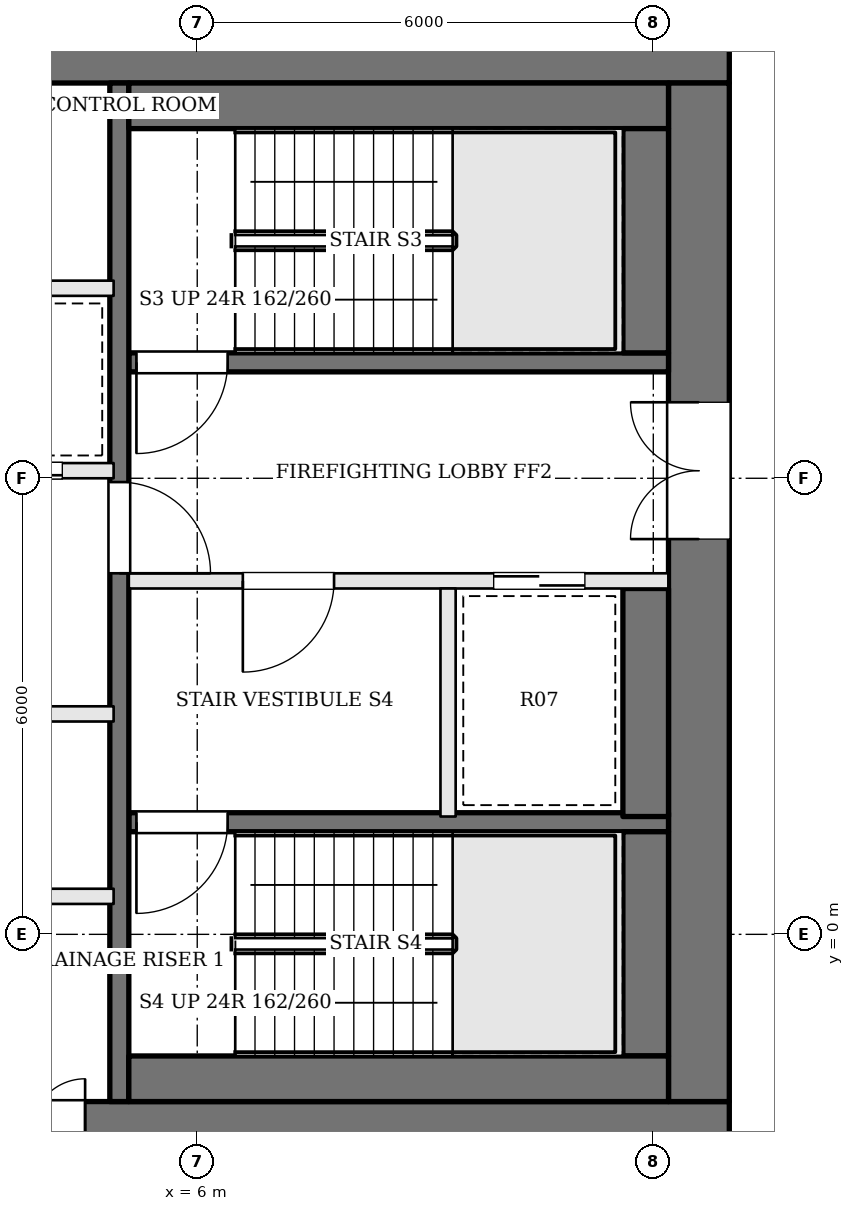
"""IFC4 building model, lengths in metres.
Left out: names, types, materials, properties, quantities, classifications, styles, units other than length and angle.
Written with IfcOpenShell. Run it as: python <this file> out.ifc"""

import sys

from ifc_helpers import new_model, si_unit, direction, frame, frame_2d, origin, place, context, subcontext, project, spatial, rectangle, extrude, element, fill, save


model = new_model("IFC4")
c1 = context("Model", 3, precision=1e-05, world=origin(), true_north=direction((0.0, 1.0)))
c2 = subcontext(c1, "Body", "Model", "MODEL_VIEW")
j1 = project(units=[si_unit("LENGTHUNIT", "METRE"), si_unit("PLANEANGLEUNIT", "RADIAN")], contexts=[c1])
p1 = place(None, origin())
s1 = spatial("IfcSite", under=j1, at=p1, CompositionType="ELEMENT")
p2 = place(p1, origin())
s2 = spatial("IfcBuilding", under=s1, at=p2, CompositionType="ELEMENT")
p3 = place(p2, frame((0.0, 0.0, 300.0)))
s3 = spatial("IfcBuildingStorey", under=s2, at=p3, CompositionType="ELEMENT", Elevation=300.0)
p4 = place(p3, frame((-13.0, 11.6, 0.0), z_axis=(0.0, 0.0, 1.0), x_axis=(1.0, 0.0, 0.0)))
e1 = element("IfcWall", 1, at=p4, inside=s3, PredefinedType="SHEAR", context=c2, shape_type="SweptSolid", body=[
    extrude(rectangle(XDim=26.0, YDim=0.8, at=frame_2d((13.0, 0.0))), origin(), (0.0, 0.0, 1.0), 3.9),
])
p5 = place(p4, frame((8.975, 0.0, 0.0)))
e2 = element("IfcOpeningElement", 2, at=p5, cuts=e1, PredefinedType="OPENING", context=c2, shape_type="SweptSolid", body=[
    extrude(rectangle(XDim=0.7, YDim=2.1, at=frame_2d((0.35, 1.05))), frame((0.0, 0.41, 0.0), z_axis=(0.0, -1.0, 0.0), x_axis=(1.0, 0.0, 0.0)), (0.0, 0.0, 1.0), 0.82),
])
p6 = place(p4, frame((11.025, 0.0, 0.0)))
e3 = element("IfcOpeningElement", 3, at=p6, cuts=e1, PredefinedType="OPENING", context=c2, shape_type="SweptSolid", body=[
    extrude(rectangle(XDim=0.7, YDim=2.1, at=frame_2d((0.35, 1.05))), frame((0.0, 0.41, 0.0), z_axis=(0.0, -1.0, 0.0), x_axis=(1.0, 0.0, 0.0)), (0.0, 0.0, 1.0), 0.82),
])
p7 = place(p4, frame((12.925, 0.0, 0.0)))
e4 = element("IfcOpeningElement", 4, at=p7, cuts=e1, PredefinedType="OPENING", context=c2, shape_type="SweptSolid", body=[
    extrude(rectangle(XDim=1.0, YDim=2.1, at=frame_2d((0.5, 1.05))), frame((0.0, 0.41, 0.0), z_axis=(0.0, -1.0, 0.0), x_axis=(1.0, 0.0, 0.0)), (0.0, 0.0, 1.0), 0.82),
])
p8 = place(p4, frame((15.775, 0.0, 0.0)))
e5 = element("IfcOpeningElement", 5, at=p8, cuts=e1, PredefinedType="OPENING", context=c2, shape_type="SweptSolid", body=[
    extrude(rectangle(XDim=1.0, YDim=2.1, at=frame_2d((0.5, 1.05))), frame((0.0, 0.41, 0.0), z_axis=(0.0, -1.0, 0.0), x_axis=(1.0, 0.0, 0.0)), (0.0, 0.0, 1.0), 0.82),
])
p9 = place(p3, frame((-13.0, -2.6, 0.0), z_axis=(0.0, 0.0, 1.0), x_axis=(1.0, 0.0, 0.0)))
e6 = element("IfcWall", 6, at=p9, inside=s3, PredefinedType="SHEAR", context=c2, shape_type="SweptSolid", body=[
    extrude(rectangle(XDim=26.0, YDim=0.8, at=frame_2d((13.0, 0.0))), origin(), (0.0, 0.0, 1.0), 3.9),
])
p10 = place(p9, frame((9.65, 0.0, 0.0)))
e7 = element("IfcOpeningElement", 7, at=p10, cuts=e6, PredefinedType="OPENING", context=c2, shape_type="SweptSolid", body=[
    extrude(rectangle(XDim=0.9, YDim=2.1, at=frame_2d((0.45, 1.05))), frame((0.0, 0.41, 0.0), z_axis=(0.0, -1.0, 0.0), x_axis=(1.0, 0.0, 0.0)), (0.0, 0.0, 1.0), 0.82),
])
p11 = place(p9, frame((12.925, 0.0, 0.0)))
e8 = element("IfcOpeningElement", 8, at=p11, cuts=e6, PredefinedType="OPENING", context=c2, shape_type="SweptSolid", body=[
    extrude(rectangle(XDim=0.9, YDim=2.1, at=frame_2d((0.45, 1.05))), frame((0.0, 0.41, 0.0), z_axis=(0.0, -1.0, 0.0), x_axis=(1.0, 0.0, 0.0)), (0.0, 0.0, 1.0), 0.82),
])
p12 = place(p9, frame((15.05, 0.0, 0.0)))
e9 = element("IfcOpeningElement", 9, at=p12, cuts=e6, PredefinedType="OPENING", context=c2, shape_type="SweptSolid", body=[
    extrude(rectangle(XDim=1.0, YDim=2.1, at=frame_2d((0.5, 1.05))), frame((0.0, 0.41, 0.0), z_axis=(0.0, -1.0, 0.0), x_axis=(1.0, 0.0, 0.0)), (0.0, 0.0, 1.0), 0.82),
])
p13 = place(p9, frame((16.825, 0.0, 0.0)))
e10 = element("IfcOpeningElement", 10, at=p13, cuts=e6, PredefinedType="OPENING", context=c2, shape_type="SweptSolid", body=[
    extrude(rectangle(XDim=0.7, YDim=2.1, at=frame_2d((0.35, 1.05))), frame((0.0, 0.41, 0.0), z_axis=(0.0, -1.0, 0.0), x_axis=(1.0, 0.0, 0.0)), (0.0, 0.0, 1.0), 0.82),
])
p14 = place(p3, frame((12.6, -2.2, 0.0), z_axis=(0.0, 0.0, 1.0), x_axis=(0.0, 1.0, 0.0)))
e11 = element("IfcWall", 11, at=p14, inside=s3, PredefinedType="SHEAR", context=c2, shape_type="SweptSolid", body=[
    extrude(rectangle(XDim=13.4, YDim=0.8, at=frame_2d((6.7, 0.0))), origin(), (0.0, 0.0, 1.0), 3.9),
])
p15 = place(p14, frame((7.4, 0.0, 0.0)))
e12 = element("IfcOpeningElement", 12, at=p15, cuts=e11, PredefinedType="OPENING", context=c2, shape_type="SweptSolid", body=[
    extrude(rectangle(XDim=1.8, YDim=2.1, at=frame_2d((0.9, 1.05))), frame((0.0, 0.41, 0.0), z_axis=(0.0, -1.0, 0.0), x_axis=(1.0, 0.0, 0.0)), (0.0, 0.0, 1.0), 0.82),
])
p16 = place(p3, frame((12.2, 7.525, 0.0), z_axis=(0.0, 0.0, 1.0), x_axis=(-1.0, 0.0, 0.0)))
e13 = element("IfcWall", 13, at=p16, inside=s3, PredefinedType="SOLIDWALL", context=c2, shape_type="SweptSolid", body=[
    extrude(rectangle(XDim=7.1, YDim=0.25, at=frame_2d((3.55, 0.0))), origin(), (0.0, 0.0, 1.0), 3.7),
])
p17 = place(p16, frame((5.8, 0.0, 0.0)))
e14 = element("IfcOpeningElement", 14, at=p17, cuts=e13, PredefinedType="OPENING", context=c2, shape_type="SweptSolid", body=[
    extrude(rectangle(XDim=1.2, YDim=2.1, at=frame_2d((0.6, 1.05))), frame((0.0, 0.135, 0.0), z_axis=(0.0, -1.0, 0.0), x_axis=(1.0, 0.0, 0.0)), (0.0, 0.0, 1.0), 0.27),
])
p18 = place(p3, frame((12.2, 4.65, 0.0), z_axis=(0.0, 0.0, 1.0), x_axis=(-1.0, 0.0, 0.0)))
e15 = element("IfcWall", 15, at=p18, inside=s3, PredefinedType="SOLIDWALL", context=c2, shape_type="SweptSolid", body=[
    extrude(rectangle(XDim=7.1, YDim=0.2, at=frame_2d((3.55, 0.0))), origin(), (0.0, 0.0, 1.0), 3.7),
])
p19 = place(p18, frame((4.4, 0.0, 0.0)))
e16 = element("IfcOpeningElement", 16, at=p19, cuts=e15, PredefinedType="OPENING", context=c2, shape_type="SweptSolid", body=[
    extrude(rectangle(XDim=1.2, YDim=2.1, at=frame_2d((0.6, 1.05))), frame((0.0, 0.11, 0.0), z_axis=(0.0, -1.0, 0.0), x_axis=(1.0, 0.0, 0.0)), (0.0, 0.0, 1.0), 0.22),
])
p20 = place(p18, frame((1.1, 0.0, 0.0)))
e17 = element("IfcOpeningElement", 17, at=p20, cuts=e15, PredefinedType="OPENING", context=c2, shape_type="SweptSolid", body=[
    extrude(rectangle(XDim=1.2, YDim=2.1, at=frame_2d((0.6, 1.05))), frame((0.0, 0.11, 0.0), z_axis=(0.0, -1.0, 0.0), x_axis=(1.0, 0.0, 0.0)), (0.0, 0.0, 1.0), 0.22),
])
p21 = place(p3, frame((12.2, 1.475, 0.0), z_axis=(0.0, 0.0, 1.0), x_axis=(-1.0, 0.0, 0.0)))
e18 = element("IfcWall", 18, at=p21, inside=s3, PredefinedType="SOLIDWALL", context=c2, shape_type="SweptSolid", body=[
    extrude(rectangle(XDim=7.1, YDim=0.25, at=frame_2d((3.55, 0.0))), origin(), (0.0, 0.0, 1.0), 3.7),
])
p22 = place(p21, frame((5.8, 0.0, 0.0)))
e19 = element("IfcOpeningElement", 19, at=p22, cuts=e18, PredefinedType="OPENING", context=c2, shape_type="SweptSolid", body=[
    extrude(rectangle(XDim=1.2, YDim=2.1, at=frame_2d((0.6, 1.05))), frame((0.0, 0.135, 0.0), z_axis=(0.0, -1.0, 0.0), x_axis=(1.0, 0.0, 0.0)), (0.0, 0.0, 1.0), 0.27),
])
p23 = place(p3, frame((9.3, 4.55, 0.0), z_axis=(0.0, 0.0, 1.0), x_axis=(0.0, -1.0, 0.0)))
e20 = element("IfcWall", 20, at=p23, inside=s3, PredefinedType="SOLIDWALL", context=c2, shape_type="SweptSolid", body=[
    extrude(rectangle(XDim=3.0, YDim=0.2, at=frame_2d((1.5, 0.0))), origin(), (0.0, 0.0, 1.0), 3.7),
])
p24 = place(p3, frame((4.975, 11.2, 0.0), z_axis=(0.0, 0.0, 1.0), x_axis=(0.0, -1.0, 0.0)))
e21 = element("IfcWall", 21, at=p24, inside=s3, PredefinedType="SOLIDWALL", context=c2, shape_type="SweptSolid", body=[
    extrude(rectangle(XDim=13.4, YDim=0.25, at=frame_2d((6.7, 0.0))), origin(), (0.0, 0.0, 1.0), 3.7),
])
p25 = place(p24, frame((5.25, 0.0, 0.0)))
e22 = element("IfcOpeningElement", 22, at=p25, cuts=e21, PredefinedType="OPENING", context=c2, shape_type="SweptSolid", body=[
    extrude(rectangle(XDim=1.2, YDim=2.1, at=frame_2d((0.6, 1.05))), frame((0.0, 0.135, 0.0), z_axis=(0.0, -1.0, 0.0), x_axis=(1.0, 0.0, 0.0)), (0.0, 0.0, 1.0), 0.27),
])
p26 = place(p3, frame((12.2, 10.9, 0.0), z_axis=(0.0, 0.0, 1.0), x_axis=(-1.0, 0.0, 0.0)))
e23 = element("IfcWall", 23, at=p26, inside=s3, PredefinedType="SOLIDWALL", context=c2, shape_type="SweptSolid", body=[
    extrude(rectangle(XDim=7.1, YDim=0.6, at=frame_2d((3.55, 0.0))), origin(), (0.0, 0.0, 1.0), 3.7),
])
p27 = place(p3, frame((11.9, 10.6, 0.0), z_axis=(0.0, 0.0, 1.0), x_axis=(0.0, -1.0, 0.0)))
e24 = element("IfcWall", 24, at=p27, inside=s3, PredefinedType="SOLIDWALL", context=c2, shape_type="SweptSolid", body=[
    extrude(rectangle(XDim=2.95, YDim=0.6, at=frame_2d((1.475, 0.0))), origin(), (0.0, 0.0, 1.0), 3.7),
])
p28 = place(p3, frame((11.9, 4.55, 0.0), z_axis=(0.0, 0.0, 1.0), x_axis=(0.0, -1.0, 0.0)))
e25 = element("IfcWall", 25, at=p28, inside=s3, PredefinedType="SOLIDWALL", context=c2, shape_type="SweptSolid", body=[
    extrude(rectangle(XDim=3.0, YDim=0.6, at=frame_2d((1.5, 0.0))), origin(), (0.0, 0.0, 1.0), 3.7),
])
p29 = place(p3, frame((11.9, 1.35, 0.0), z_axis=(0.0, 0.0, 1.0), x_axis=(0.0, -1.0, 0.0)))
e26 = element("IfcWall", 26, at=p29, inside=s3, PredefinedType="SOLIDWALL", context=c2, shape_type="SweptSolid", body=[
    extrude(rectangle(XDim=2.95, YDim=0.6, at=frame_2d((1.475, 0.0))), origin(), (0.0, 0.0, 1.0), 3.7),
])
p30 = place(p3, frame((12.2, -1.9, 0.0), z_axis=(0.0, 0.0, 1.0), x_axis=(-1.0, 0.0, 0.0)))
e27 = element("IfcWall", 27, at=p30, inside=s3, PredefinedType="SOLIDWALL", context=c2, shape_type="SweptSolid", body=[
    extrude(rectangle(XDim=7.1, YDim=0.6, at=frame_2d((3.55, 0.0))), origin(), (0.0, 0.0, 1.0), 3.7),
])
p31 = place(p3, frame((-4.9, 0.5, 0.0), z_axis=(0.0, 0.0, 1.0), x_axis=(1.0, 0.0, 0.0)))
e28 = element("IfcWall", 28, at=p31, inside=s3, PredefinedType="SOLIDWALL", context=c2, shape_type="SweptSolid", body=[
    extrude(rectangle(XDim=9.8, YDim=0.2, at=frame_2d((4.9, 0.0))), origin(), (0.0, 0.0, 1.0), 3.7),
])
p32 = place(p3, frame((-4.9, 2.9, 0.0), z_axis=(0.0, 0.0, 1.0), x_axis=(1.0, 0.0, 0.0)))
e29 = element("IfcWall", 29, at=p32, inside=s3, PredefinedType="SOLIDWALL", context=c2, shape_type="SweptSolid", body=[
    extrude(rectangle(XDim=9.8, YDim=0.2, at=frame_2d((4.9, 0.0))), origin(), (0.0, 0.0, 1.0), 3.7),
])
p33 = place(p32, frame((0.675, 0.0, 0.0)))
e30 = element("IfcOpeningElement", 30, at=p33, cuts=e29, PredefinedType="OPENING", context=c2, shape_type="SweptSolid", body=[
    extrude(rectangle(XDim=1.1, YDim=2.1, at=frame_2d((0.55, 1.05))), frame((0.0, 0.11, 0.0), z_axis=(0.0, -1.0, 0.0), x_axis=(1.0, 0.0, 0.0)), (0.0, 0.0, 1.0), 0.22),
])
p34 = place(p32, frame((2.613, 0.0, 0.0)))
e31 = element("IfcOpeningElement", 31, at=p34, cuts=e29, PredefinedType="OPENING", context=c2, shape_type="SweptSolid", body=[
    extrude(rectangle(XDim=0.9, YDim=2.1, at=frame_2d((0.45, 1.05))), frame((0.0, 0.11, 0.0), z_axis=(0.0, -1.0, 0.0), x_axis=(1.0, 0.0, 0.0)), (0.0, 0.0, 1.0), 0.22),
])
p35 = place(p32, frame((4.35, 0.0, 0.0)))
e32 = element("IfcOpeningElement", 32, at=p35, cuts=e29, PredefinedType="OPENING", context=c2, shape_type="SweptSolid", body=[
    extrude(rectangle(XDim=1.1, YDim=2.1, at=frame_2d((0.55, 1.05))), frame((0.0, 0.11, 0.0), z_axis=(0.0, -1.0, 0.0), x_axis=(1.0, 0.0, 0.0)), (0.0, 0.0, 1.0), 0.22),
])
p36 = place(p32, frame((7.463, 0.0, 0.0)))
e33 = element("IfcOpeningElement", 33, at=p36, cuts=e29, PredefinedType="OPENING", context=c2, shape_type="SweptSolid", body=[
    extrude(rectangle(XDim=1.0, YDim=2.1, at=frame_2d((0.5, 1.05))), frame((0.0, 0.11, 0.0), z_axis=(0.0, -1.0, 0.0), x_axis=(1.0, 0.0, 0.0)), (0.0, 0.0, 1.0), 0.22),
])
p37 = place(p3, frame((-4.9, 6.1, 0.0), z_axis=(0.0, 0.0, 1.0), x_axis=(1.0, 0.0, 0.0)))
e34 = element("IfcWall", 34, at=p37, inside=s3, PredefinedType="SOLIDWALL", context=c2, shape_type="SweptSolid", body=[
    extrude(rectangle(XDim=9.8, YDim=0.2, at=frame_2d((4.9, 0.0))), origin(), (0.0, 0.0, 1.0), 3.7),
])
p38 = place(p37, frame((0.675, 0.0, 0.0)))
e35 = element("IfcOpeningElement", 35, at=p38, cuts=e34, PredefinedType="OPENING", context=c2, shape_type="SweptSolid", body=[
    extrude(rectangle(XDim=1.1, YDim=2.1, at=frame_2d((0.55, 1.05))), frame((0.0, 0.11, 0.0), z_axis=(0.0, -1.0, 0.0), x_axis=(1.0, 0.0, 0.0)), (0.0, 0.0, 1.0), 0.22),
])
p39 = place(p37, frame((3.125, 0.0, 0.0)))
e36 = element("IfcOpeningElement", 36, at=p39, cuts=e34, PredefinedType="OPENING", context=c2, shape_type="SweptSolid", body=[
    extrude(rectangle(XDim=1.1, YDim=2.1, at=frame_2d((0.55, 1.05))), frame((0.0, 0.11, 0.0), z_axis=(0.0, -1.0, 0.0), x_axis=(1.0, 0.0, 0.0)), (0.0, 0.0, 1.0), 0.22),
])
p40 = place(p37, frame((5.575, 0.0, 0.0)))
e37 = element("IfcOpeningElement", 37, at=p40, cuts=e34, PredefinedType="OPENING", context=c2, shape_type="SweptSolid", body=[
    extrude(rectangle(XDim=1.1, YDim=2.1, at=frame_2d((0.55, 1.05))), frame((0.0, 0.11, 0.0), z_axis=(0.0, -1.0, 0.0), x_axis=(1.0, 0.0, 0.0)), (0.0, 0.0, 1.0), 0.22),
])
p41 = place(p37, frame((8.025, 0.0, 0.0)))
e38 = element("IfcOpeningElement", 38, at=p41, cuts=e34, PredefinedType="OPENING", context=c2, shape_type="SweptSolid", body=[
    extrude(rectangle(XDim=1.1, YDim=2.1, at=frame_2d((0.55, 1.05))), frame((0.0, 0.11, 0.0), z_axis=(0.0, -1.0, 0.0), x_axis=(1.0, 0.0, 0.0)), (0.0, 0.0, 1.0), 0.22),
])
p42 = place(p3, frame((-4.9, 8.5, 0.0), z_axis=(0.0, 0.0, 1.0), x_axis=(1.0, 0.0, 0.0)))
e39 = element("IfcWall", 39, at=p42, inside=s3, PredefinedType="SOLIDWALL", context=c2, shape_type="SweptSolid", body=[
    extrude(rectangle(XDim=9.8, YDim=0.2, at=frame_2d((4.9, 0.0))), origin(), (0.0, 0.0, 1.0), 3.7),
])
p43 = place(p15, origin())
e40 = element("IfcDoor", 40, at=p43, inside=s3, OperationType="DOUBLE_DOOR_SINGLE_SWING", PredefinedType="DOOR", context=c2, shape_type="SweptSolid", body=[
    extrude(rectangle(XDim=1.8, YDim=2.1, at=frame_2d((0.9, 1.05))), frame((0.0, 0.025, 0.0), z_axis=(0.0, -1.0, 0.0), x_axis=(1.0, 0.0, 0.0)), (0.0, 0.0, 1.0), 0.05),
])
fill(e12, e40)
p44 = place(p25, origin())
e41 = element("IfcDoor", 41, at=p44, inside=s3, OperationType="SINGLE_SWING_RIGHT", PredefinedType="DOOR", context=c2, shape_type="SweptSolid", body=[
    extrude(rectangle(XDim=1.2, YDim=2.1, at=frame_2d((0.6, 1.05))), frame((0.0, 0.025, 0.0), z_axis=(0.0, -1.0, 0.0), x_axis=(1.0, 0.0, 0.0)), (0.0, 0.0, 1.0), 0.05),
])
fill(e22, e41)
p45 = place(p19, origin())
e42 = element("IfcDoor", 42, at=p45, inside=s3, OperationType="SINGLE_SWING_RIGHT", PredefinedType="DOOR", context=c2, shape_type="SweptSolid", body=[
    extrude(rectangle(XDim=1.2, YDim=2.1, at=frame_2d((0.6, 1.05))), frame((0.0, 0.025, 0.0), z_axis=(0.0, -1.0, 0.0), x_axis=(1.0, 0.0, 0.0)), (0.0, 0.0, 1.0), 0.05),
])
fill(e16, e42)
p46 = place(p17, origin())
e43 = element("IfcDoor", 43, at=p46, inside=s3, OperationType="SINGLE_SWING_RIGHT", PredefinedType="DOOR", context=c2, shape_type="SweptSolid", body=[
    extrude(rectangle(XDim=1.2, YDim=2.1, at=frame_2d((0.6, 1.05))), frame((0.0, 0.025, 0.0), z_axis=(0.0, -1.0, 0.0), x_axis=(1.0, 0.0, 0.0)), (0.0, 0.0, 1.0), 0.05),
])
fill(e14, e43)
p47 = place(p22, origin())
e44 = element("IfcDoor", 44, at=p47, inside=s3, OperationType="SINGLE_SWING_RIGHT", PredefinedType="DOOR", context=c2, shape_type="SweptSolid", body=[
    extrude(rectangle(XDim=1.2, YDim=2.1, at=frame_2d((0.6, 1.05))), frame((0.0, 0.025, 0.0), z_axis=(0.0, -1.0, 0.0), x_axis=(1.0, 0.0, 0.0)), (0.0, 0.0, 1.0), 0.05),
])
fill(e19, e44)
p48 = place(p20, origin())
e45 = element("IfcDoor", 45, at=p48, inside=s3, OperationType="SLIDING_TO_RIGHT", PredefinedType="DOOR", context=c2, shape_type="SweptSolid", body=[
    extrude(rectangle(XDim=1.2, YDim=2.1, at=frame_2d((0.6, 1.05))), frame((0.0, 0.025, 0.0), z_axis=(0.0, -1.0, 0.0), x_axis=(1.0, 0.0, 0.0)), (0.0, 0.0, 1.0), 0.05),
])
fill(e17, e45)
p49 = place(p41, origin())
e46 = element("IfcDoor", 46, at=p49, inside=s3, OperationType="SLIDING_TO_LEFT", PredefinedType="DOOR", context=c2, shape_type="SweptSolid", body=[
    extrude(rectangle(XDim=1.1, YDim=2.1, at=frame_2d((0.55, 1.05))), frame((0.0, 0.025, 0.0), z_axis=(0.0, -1.0, 0.0), x_axis=(1.0, 0.0, 0.0)), (0.0, 0.0, 1.0), 0.05),
])
fill(e38, e46)
p50 = place(p13, origin())
e47 = element("IfcDoor", 47, at=p50, inside=s3, OperationType="SINGLE_SWING_RIGHT", PredefinedType="DOOR", context=c2, shape_type="SweptSolid", body=[
    extrude(rectangle(XDim=0.7, YDim=2.1, at=frame_2d((0.35, 1.05))), frame((0.0, 0.025, 0.0), z_axis=(0.0, -1.0, 0.0), x_axis=(1.0, 0.0, 0.0)), (0.0, 0.0, 1.0), 0.05),
])
fill(e10, e47)
save(model, sys.argv[1])
